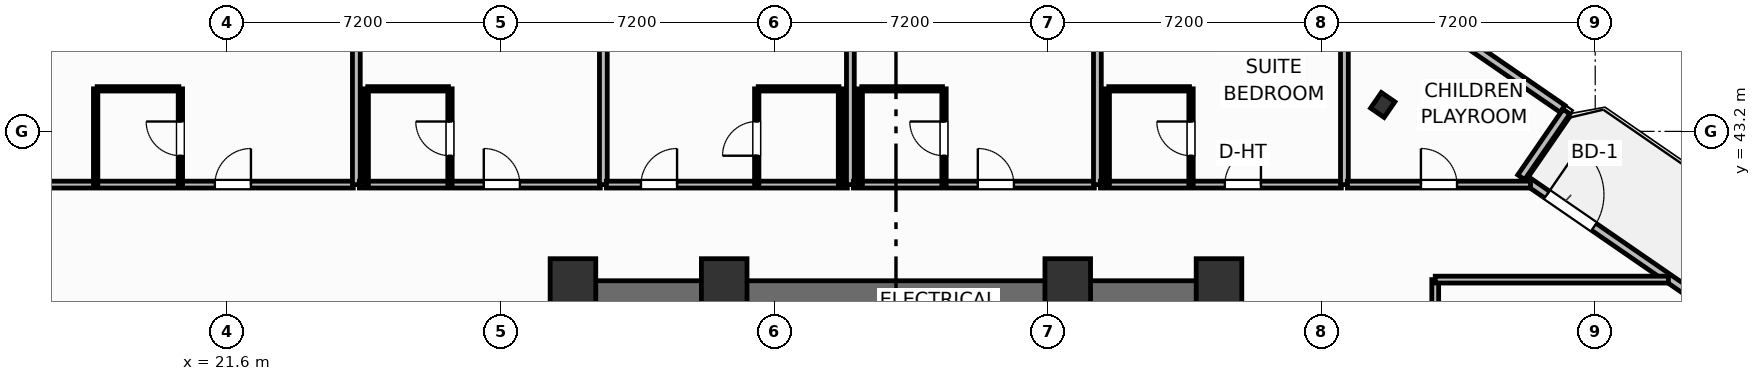
"""IFC4 building model, lengths in metres.
Left out: names, types, materials, properties, quantities, classifications, styles, units other than length and angle.
Written with IfcOpenShell. Run it as: python <this file> out.ifc"""

import sys

from ifc_helpers import new_model, si_unit, direction, frame, frame_2d, origin, origin_2d, place, context, subcontext, project, spatial, rectangle, i_section, extrude, element, fill, save


model = new_model("IFC4")
c1 = context("Model", 3, precision=1e-05, world=origin(), true_north=direction((0.0, 1.0)))
c2 = subcontext(c1, "Body", "Model", "MODEL_VIEW")
j1 = project(units=[si_unit("LENGTHUNIT", "METRE"), si_unit("PLANEANGLEUNIT", "RADIAN")], contexts=[c1])
p1 = place(None, origin())
s1 = spatial("IfcSite", under=j1, at=p1, CompositionType="ELEMENT")
p2 = place(p1, origin())
s2 = spatial("IfcBuilding", under=s1, at=p2, CompositionType="ELEMENT")
p3 = place(p2, frame((0.0, 0.0, 60.3)))
s3 = spatial("IfcBuildingStorey", under=s2, at=p3, CompositionType="ELEMENT", Elevation=60.3)
for number, where, z_axis, x_axis in (
    (1, (30.7, 39.05, 0.0), (0.0, 0.0, 1.0), (1.0, 0.0, 0.0)),
    (2, (34.68, 39.05, 0.0), (0.0, 0.0, 1.0), (1.0, 0.0, 0.0)),
    (3, (43.72, 39.05, 0.0), (0.0, 0.0, 1.0), (1.0, 0.0, 0.0)),
    (4, (47.7, 39.05, 0.0), (0.0, 0.0, 1.0), (1.0, 0.0, 0.0)),
):
    element("IfcColumn", number, at=place(p3, frame(where, z_axis=z_axis, x_axis=x_axis)), inside=s3, PredefinedType="COLUMN", context=c2, shape_type="SweptSolid", body=[
        extrude(rectangle(XDim=1.2, YDim=1.6, at=origin_2d()), origin(), (0.0, 0.0, 1.0), 3.7),
    ])
p4 = place(p3, frame((30.28, 38.845, 0.0), z_axis=(0.0, 0.0, 1.0), x_axis=(1.0, 0.0, 0.0)))
e5 = element("IfcWall", 5, at=p4, inside=s3, PredefinedType="SHEAR", context=c2, shape_type="SweptSolid", body=[
    extrude(rectangle(XDim=17.84, YDim=0.85, at=frame_2d((8.92, 0.0))), origin(), (0.0, 0.0, 1.0), 3.45),
])
p5 = place(p3, frame((52.009, 43.896, 0.0), z_axis=(0.0, 0.0, 1.0), x_axis=(0.823532597628, -0.567268949127, 0.0)))
e6 = element("IfcColumn", 6, at=p5, inside=s3, PredefinedType="COLUMN", context=c2, shape_type="SweptSolid", body=[
    extrude(i_section(OverallWidth=0.432, OverallDepth=0.498, WebThickness=0.056, FlangeThickness=0.089, FilletRadius=0.025, at=origin_2d()), origin(), (0.0, 0.0, 1.0), 3.7),
])
p6 = place(p3, frame((55.757, 41.933, 0.0), z_axis=(0.0, 0.0, 1.0), x_axis=(0.823534636215, -0.567265989598, 0.0)))
e7 = element("IfcWall", 7, at=p6, inside=s3, PredefinedType="SOLIDWALL", context=c2, shape_type="SweptSolid", body=[
    extrude(rectangle(XDim=6.0, YDim=0.22, at=frame_2d((3.0, 0.0))), origin(), (0.0, 0.0, 1.0), 2.73),
])
p7 = place(p6, frame((0.696, 0.0, 0.0)))
e8 = element("IfcOpeningElement", 8, at=p7, cuts=e7, PredefinedType="OPENING", context=c2, shape_type="SweptSolid", body=[
    extrude(rectangle(XDim=1.5, YDim=2.25, at=frame_2d((0.75, 1.125))), frame((0.0, 0.12, 0.0), z_axis=(0.0, -1.0, 0.0), x_axis=(1.0, 0.0, 0.0)), (0.0, 0.0, 1.0), 0.24),
])
p8 = place(p3, frame((55.653, 41.993, 0.0), z_axis=(0.0, 0.0, 1.0), x_axis=(0.567273696173, 0.823529327729, 0.0)))
e9 = element("IfcWall", 9, at=p8, inside=s3, PredefinedType="SOLIDWALL", context=c2, shape_type="SweptSolid", body=[
    extrude(rectangle(XDim=2.1, YDim=0.22, at=frame_2d((1.05, 0.0))), origin(), (0.0, 0.0, 1.0), 2.73),
])
p9 = place(p3, frame((56.741, 43.793, 0.0), z_axis=(0.0, 0.0, 1.0), x_axis=(-0.823530942962, 0.56727135128, 0.0)))
e10 = element("IfcWall", 10, at=p9, inside=s3, PredefinedType="SOLIDWALL", context=c2, shape_type="SweptSolid", body=[
    extrude(rectangle(XDim=8.035, YDim=0.22, at=frame_2d((4.018, 0.0))), origin(), (0.0, 0.0, 1.0), 2.73),
])
p10 = place(p9, frame((3.192, 0.0, 0.8)))
e11 = element("IfcOpeningElement", 11, at=p10, cuts=e10, PredefinedType="OPENING", context=c2, shape_type="SweptSolid", body=[
    extrude(rectangle(XDim=1.65, YDim=1.65, at=frame_2d((0.825, 0.825))), frame((0.0, 0.12, 0.0), z_axis=(0.0, -1.0, 0.0), x_axis=(1.0, 0.0, 0.0)), (0.0, 0.0, 1.0), 0.24),
])
p11 = place(p3, frame((3.176, 41.8, 0.0), z_axis=(0.0, 0.0, 1.0), x_axis=(1.0, 0.0, 0.0)))
e12 = element("IfcWall", 12, at=p11, inside=s3, PredefinedType="PARTITIONING", context=c2, shape_type="SweptSolid", body=[
    extrude(rectangle(XDim=21.744, YDim=0.18, at=frame_2d((10.872, 0.0))), origin(), (0.0, 0.0, 1.0), 3.45),
])
p12 = place(p11, frame((18.101, 0.0, 0.0)))
e13 = element("IfcOpeningElement", 13, at=p12, cuts=e12, PredefinedType="OPENING", context=c2, shape_type="SweptSolid", body=[
    extrude(rectangle(XDim=0.95, YDim=2.15, at=frame_2d((0.475, 1.075))), frame((0.0, 0.1, 0.0), z_axis=(0.0, -1.0, 0.0), x_axis=(1.0, 0.0, 0.0)), (0.0, 0.0, 1.0), 0.2),
])
p13 = place(p3, frame((18.18, 44.32, 0.0), z_axis=(0.0, 0.0, 1.0), x_axis=(1.0, 0.0, 0.0)))
e14 = element("IfcWall", 14, at=p13, inside=s3, PredefinedType="PARTITIONING", context=c2, shape_type="SweptSolid", body=[
    extrude(rectangle(XDim=2.15, YDim=0.115, at=frame_2d((1.075, 0.0))), origin(), (0.0, 0.0, 1.0), 3.45),
])
p14 = place(p3, frame((20.37, 41.8, 0.0), z_axis=(0.0, 0.0, 1.0), x_axis=(0.0, 1.0, 0.0)))
e15 = element("IfcWall", 15, at=p14, inside=s3, PredefinedType="PARTITIONING", context=c2, shape_type="SweptSolid", body=[
    extrude(rectangle(XDim=2.52, YDim=0.115, at=frame_2d((1.26, 0.0))), origin(), (0.0, 0.0, 1.0), 3.45),
])
p15 = place(p14, frame((0.76, 0.0, 0.0)))
e16 = element("IfcOpeningElement", 16, at=p15, cuts=e15, PredefinedType="OPENING", context=c2, shape_type="SweptSolid", body=[
    extrude(rectangle(XDim=0.9, YDim=2.05, at=frame_2d((0.45, 1.025))), frame((0.0, 0.067, 0.0), z_axis=(0.0, -1.0, 0.0), x_axis=(1.0, 0.0, 0.0)), (0.0, 0.0, 1.0), 0.135),
])
p16 = place(p3, frame((18.14, 41.8, 0.0), z_axis=(0.0, 0.0, 1.0), x_axis=(0.0, 1.0, 0.0)))
e17 = element("IfcWall", 17, at=p16, inside=s3, PredefinedType="PARTITIONING", context=c2, shape_type="SweptSolid", body=[
    extrude(rectangle(XDim=2.52, YDim=0.115, at=frame_2d((1.26, 0.0))), origin(), (0.0, 0.0, 1.0), 3.45),
])
p17 = place(p3, frame((25.0, 41.8, 0.0), z_axis=(0.0, 0.0, 1.0), x_axis=(0.0, 1.0, 0.0)))
e18 = element("IfcWall", 18, at=p17, inside=s3, PredefinedType="PARTITIONING", context=c2, shape_type="SweptSolid", body=[
    extrude(rectangle(XDim=14.2, YDim=0.205, at=frame_2d((7.1, 0.0))), origin(), (0.0, 0.0, 1.0), 3.45),
])
p18 = place(p3, frame((25.08, 41.8, 0.0), z_axis=(0.0, 0.0, 1.0), x_axis=(1.0, 0.0, 0.0)))
e19 = element("IfcWall", 19, at=p18, inside=s3, PredefinedType="PARTITIONING", context=c2, shape_type="SweptSolid", body=[
    extrude(rectangle(XDim=6.34, YDim=0.18, at=frame_2d((3.17, 0.0))), origin(), (0.0, 0.0, 1.0), 3.45),
])
p19 = place(p18, frame((3.274, 0.0, 0.0)))
e20 = element("IfcOpeningElement", 20, at=p19, cuts=e19, PredefinedType="OPENING", context=c2, shape_type="SweptSolid", body=[
    extrude(rectangle(XDim=0.95, YDim=2.15, at=frame_2d((0.475, 1.075))), frame((0.0, 0.1, 0.0), z_axis=(0.0, -1.0, 0.0), x_axis=(1.0, 0.0, 0.0)), (0.0, 0.0, 1.0), 0.2),
])
p20 = place(p3, frame((25.3, 44.32, 0.0), z_axis=(0.0, 0.0, 1.0), x_axis=(1.0, 0.0, 0.0)))
e21 = element("IfcWall", 21, at=p20, inside=s3, PredefinedType="PARTITIONING", context=c2, shape_type="SweptSolid", body=[
    extrude(rectangle(XDim=2.124, YDim=0.115, at=frame_2d((1.062, 0.0))), origin(), (0.0, 0.0, 1.0), 3.45),
])
p21 = place(p3, frame((27.464, 41.8, 0.0), z_axis=(0.0, 0.0, 1.0), x_axis=(0.0, 1.0, 0.0)))
e22 = element("IfcWall", 22, at=p21, inside=s3, PredefinedType="PARTITIONING", context=c2, shape_type="SweptSolid", body=[
    extrude(rectangle(XDim=2.52, YDim=0.115, at=frame_2d((1.26, 0.0))), origin(), (0.0, 0.0, 1.0), 3.45),
])
p22 = place(p21, frame((0.76, 0.0, 0.0)))
e23 = element("IfcOpeningElement", 23, at=p22, cuts=e22, PredefinedType="OPENING", context=c2, shape_type="SweptSolid", body=[
    extrude(rectangle(XDim=0.9, YDim=2.05, at=frame_2d((0.45, 1.025))), frame((0.0, 0.067, 0.0), z_axis=(0.0, -1.0, 0.0), x_axis=(1.0, 0.0, 0.0)), (0.0, 0.0, 1.0), 0.135),
])
p23 = place(p3, frame((25.26, 41.8, 0.0), z_axis=(0.0, 0.0, 1.0), x_axis=(0.0, 1.0, 0.0)))
e24 = element("IfcWall", 24, at=p23, inside=s3, PredefinedType="PARTITIONING", context=c2, shape_type="SweptSolid", body=[
    extrude(rectangle(XDim=2.52, YDim=0.115, at=frame_2d((1.26, 0.0))), origin(), (0.0, 0.0, 1.0), 3.45),
])
p24 = place(p3, frame((31.5, 41.8, 0.0), z_axis=(0.0, 0.0, 1.0), x_axis=(0.0, 1.0, 0.0)))
e25 = element("IfcWall", 25, at=p24, inside=s3, PredefinedType="PARTITIONING", context=c2, shape_type="SweptSolid", body=[
    extrude(rectangle(XDim=14.2, YDim=0.205, at=frame_2d((7.1, 0.0))), origin(), (0.0, 0.0, 1.0), 3.45),
])
p25 = place(p3, frame((31.58, 41.8, 0.0), z_axis=(0.0, 0.0, 1.0), x_axis=(1.0, 0.0, 0.0)))
e26 = element("IfcWall", 26, at=p25, inside=s3, PredefinedType="PARTITIONING", context=c2, shape_type="SweptSolid", body=[
    extrude(rectangle(XDim=6.34, YDim=0.18, at=frame_2d((3.17, 0.0))), origin(), (0.0, 0.0, 1.0), 3.45),
])
p26 = place(p25, frame((0.91, 0.0, 0.0)))
e27 = element("IfcOpeningElement", 27, at=p26, cuts=e26, PredefinedType="OPENING", context=c2, shape_type="SweptSolid", body=[
    extrude(rectangle(XDim=0.95, YDim=2.15, at=frame_2d((0.475, 1.075))), frame((0.0, 0.1, 0.0), z_axis=(0.0, -1.0, 0.0), x_axis=(1.0, 0.0, 0.0)), (0.0, 0.0, 1.0), 0.2),
])
p27 = place(p3, frame((35.576, 44.32, 0.0), z_axis=(0.0, 0.0, 1.0), x_axis=(1.0, 0.0, 0.0)))
e28 = element("IfcWall", 28, at=p27, inside=s3, PredefinedType="PARTITIONING", context=c2, shape_type="SweptSolid", body=[
    extrude(rectangle(XDim=2.124, YDim=0.115, at=frame_2d((1.062, 0.0))), origin(), (0.0, 0.0, 1.0), 3.45),
])
p28 = place(p3, frame((35.536, 41.8, 0.0), z_axis=(0.0, 0.0, 1.0), x_axis=(0.0, 1.0, 0.0)))
e29 = element("IfcWall", 29, at=p28, inside=s3, PredefinedType="PARTITIONING", context=c2, shape_type="SweptSolid", body=[
    extrude(rectangle(XDim=2.52, YDim=0.115, at=frame_2d((1.26, 0.0))), origin(), (0.0, 0.0, 1.0), 3.45),
])
p29 = place(p28, frame((0.76, 0.0, 0.0)))
e30 = element("IfcOpeningElement", 30, at=p29, cuts=e29, PredefinedType="OPENING", context=c2, shape_type="SweptSolid", body=[
    extrude(rectangle(XDim=0.9, YDim=2.05, at=frame_2d((0.45, 1.025))), frame((0.0, 0.067, 0.0), z_axis=(0.0, -1.0, 0.0), x_axis=(1.0, 0.0, 0.0)), (0.0, 0.0, 1.0), 0.135),
])
p30 = place(p3, frame((37.74, 41.8, 0.0), z_axis=(0.0, 0.0, 1.0), x_axis=(0.0, 1.0, 0.0)))
e31 = element("IfcWall", 31, at=p30, inside=s3, PredefinedType="PARTITIONING", context=c2, shape_type="SweptSolid", body=[
    extrude(rectangle(XDim=2.52, YDim=0.115, at=frame_2d((1.26, 0.0))), origin(), (0.0, 0.0, 1.0), 3.45),
])
p31 = place(p3, frame((38.0, 41.8, 0.0), z_axis=(0.0, 0.0, 1.0), x_axis=(0.0, 1.0, 0.0)))
e32 = element("IfcWall", 32, at=p31, inside=s3, PredefinedType="PARTITIONING", context=c2, shape_type="SweptSolid", body=[
    extrude(rectangle(XDim=14.797, YDim=0.205, at=frame_2d((7.398, 0.0))), origin(), (0.0, 0.0, 1.0), 3.45),
])
p32 = place(p3, frame((38.08, 41.8, 0.0), z_axis=(0.0, 0.0, 1.0), x_axis=(1.0, 0.0, 0.0)))
e33 = element("IfcWall", 33, at=p32, inside=s3, PredefinedType="PARTITIONING", context=c2, shape_type="SweptSolid", body=[
    extrude(rectangle(XDim=6.34, YDim=0.18, at=frame_2d((3.17, 0.0))), origin(), (0.0, 0.0, 1.0), 3.45),
])
p33 = place(p32, frame((3.274, 0.0, 0.0)))
e34 = element("IfcOpeningElement", 34, at=p33, cuts=e33, PredefinedType="OPENING", context=c2, shape_type="SweptSolid", body=[
    extrude(rectangle(XDim=0.95, YDim=2.15, at=frame_2d((0.475, 1.075))), frame((0.0, 0.1, 0.0), z_axis=(0.0, -1.0, 0.0), x_axis=(1.0, 0.0, 0.0)), (0.0, 0.0, 1.0), 0.2),
])
p34 = place(p3, frame((38.3, 44.32, 0.0), z_axis=(0.0, 0.0, 1.0), x_axis=(1.0, 0.0, 0.0)))
e35 = element("IfcWall", 35, at=p34, inside=s3, PredefinedType="PARTITIONING", context=c2, shape_type="SweptSolid", body=[
    extrude(rectangle(XDim=2.124, YDim=0.115, at=frame_2d((1.062, 0.0))), origin(), (0.0, 0.0, 1.0), 3.45),
])
p35 = place(p3, frame((40.464, 41.8, 0.0), z_axis=(0.0, 0.0, 1.0), x_axis=(0.0, 1.0, 0.0)))
e36 = element("IfcWall", 36, at=p35, inside=s3, PredefinedType="PARTITIONING", context=c2, shape_type="SweptSolid", body=[
    extrude(rectangle(XDim=2.52, YDim=0.115, at=frame_2d((1.26, 0.0))), origin(), (0.0, 0.0, 1.0), 3.45),
])
p36 = place(p35, frame((0.76, 0.0, 0.0)))
e37 = element("IfcOpeningElement", 37, at=p36, cuts=e36, PredefinedType="OPENING", context=c2, shape_type="SweptSolid", body=[
    extrude(rectangle(XDim=0.9, YDim=2.05, at=frame_2d((0.45, 1.025))), frame((0.0, 0.067, 0.0), z_axis=(0.0, -1.0, 0.0), x_axis=(1.0, 0.0, 0.0)), (0.0, 0.0, 1.0), 0.135),
])
p37 = place(p3, frame((38.26, 41.8, 0.0), z_axis=(0.0, 0.0, 1.0), x_axis=(0.0, 1.0, 0.0)))
e38 = element("IfcWall", 38, at=p37, inside=s3, PredefinedType="PARTITIONING", context=c2, shape_type="SweptSolid", body=[
    extrude(rectangle(XDim=2.52, YDim=0.115, at=frame_2d((1.26, 0.0))), origin(), (0.0, 0.0, 1.0), 3.45),
])
p38 = place(p3, frame((44.5, 41.8, 0.0), z_axis=(0.0, 0.0, 1.0), x_axis=(0.0, 1.0, 0.0)))
e39 = element("IfcWall", 39, at=p38, inside=s3, PredefinedType="PARTITIONING", context=c2, shape_type="SweptSolid", body=[
    extrude(rectangle(XDim=7.851, YDim=0.205, at=frame_2d((3.925, 0.0))), origin(), (0.0, 0.0, 1.0), 3.45),
])
p39 = place(p3, frame((44.58, 41.8, 0.0), z_axis=(0.0, 0.0, 1.0), x_axis=(1.0, 0.0, 0.0)))
e40 = element("IfcWall", 40, at=p39, inside=s3, PredefinedType="PARTITIONING", context=c2, shape_type="SweptSolid", body=[
    extrude(rectangle(XDim=6.34, YDim=0.18, at=frame_2d((3.17, 0.0))), origin(), (0.0, 0.0, 1.0), 3.45),
])
p40 = place(p39, frame((3.274, 0.0, 0.0)))
e41 = element("IfcOpeningElement", 41, at=p40, cuts=e40, PredefinedType="OPENING", context=c2, shape_type="SweptSolid", body=[
    extrude(rectangle(XDim=0.95, YDim=2.15, at=frame_2d((0.475, 1.075))), frame((0.0, 0.1, 0.0), z_axis=(0.0, -1.0, 0.0), x_axis=(1.0, 0.0, 0.0)), (0.0, 0.0, 1.0), 0.2),
])
p41 = place(p3, frame((44.8, 44.32, 0.0), z_axis=(0.0, 0.0, 1.0), x_axis=(1.0, 0.0, 0.0)))
e42 = element("IfcWall", 42, at=p41, inside=s3, PredefinedType="PARTITIONING", context=c2, shape_type="SweptSolid", body=[
    extrude(rectangle(XDim=2.124, YDim=0.115, at=frame_2d((1.062, 0.0))), origin(), (0.0, 0.0, 1.0), 3.45),
])
p42 = place(p3, frame((46.964, 41.8, 0.0), z_axis=(0.0, 0.0, 1.0), x_axis=(0.0, 1.0, 0.0)))
e43 = element("IfcWall", 43, at=p42, inside=s3, PredefinedType="PARTITIONING", context=c2, shape_type="SweptSolid", body=[
    extrude(rectangle(XDim=2.52, YDim=0.115, at=frame_2d((1.26, 0.0))), origin(), (0.0, 0.0, 1.0), 2.58),
])
p43 = place(p42, frame((0.76, 0.0, 0.0)))
e44 = element("IfcOpeningElement", 44, at=p43, cuts=e43, PredefinedType="OPENING", context=c2, shape_type="SweptSolid", body=[
    extrude(rectangle(XDim=0.9, YDim=2.05, at=frame_2d((0.45, 1.025))), frame((0.0, 0.067, 0.0), z_axis=(0.0, -1.0, 0.0), x_axis=(1.0, 0.0, 0.0)), (0.0, 0.0, 1.0), 0.135),
])
p44 = place(p3, frame((44.76, 41.8, 0.0), z_axis=(0.0, 0.0, 1.0), x_axis=(0.0, 1.0, 0.0)))
e45 = element("IfcWall", 45, at=p44, inside=s3, PredefinedType="PARTITIONING", context=c2, shape_type="SweptSolid", body=[
    extrude(rectangle(XDim=2.52, YDim=0.115, at=frame_2d((1.26, 0.0))), origin(), (0.0, 0.0, 1.0), 3.45),
])
p45 = place(p3, frame((51.0, 41.8, 0.0), z_axis=(0.0, 0.0, 1.0), x_axis=(0.0, 1.0, 0.0)))
e46 = element("IfcWall", 46, at=p45, inside=s3, PredefinedType="PARTITIONING", context=c2, shape_type="SweptSolid", body=[
    extrude(rectangle(XDim=5.923, YDim=0.205, at=frame_2d((2.961, 0.0))), origin(), (0.0, 0.0, 1.0), 3.45),
])
p46 = place(p3, frame((51.08, 41.8, 0.0), z_axis=(0.0, 0.0, 1.0), x_axis=(1.0, 0.0, 0.0)))
e47 = element("IfcWall", 47, at=p46, inside=s3, PredefinedType="PARTITIONING", context=c2, shape_type="SweptSolid", body=[
    extrude(rectangle(XDim=4.817, YDim=0.18, at=frame_2d((2.408, 0.0))), origin(), (0.0, 0.0, 1.0), 3.45),
])
p47 = place(p46, frame((1.934, 0.0, 0.0)))
e48 = element("IfcOpeningElement", 48, at=p47, cuts=e47, PredefinedType="OPENING", context=c2, shape_type="SweptSolid", body=[
    extrude(rectangle(XDim=0.95, YDim=2.05, at=frame_2d((0.475, 1.025))), frame((0.0, 0.1, 0.0), z_axis=(0.0, -1.0, 0.0), x_axis=(1.0, 0.0, 0.0)), (0.0, 0.0, 1.0), 0.2),
])
p48 = place(p3, frame((53.39, 26.84, 0.0), z_axis=(0.0, 0.0, 1.0), x_axis=(0.0, 1.0, 0.0)))
e49 = element("IfcWall", 49, at=p48, inside=s3, PredefinedType="PARTITIONING", context=c2, shape_type="SweptSolid", body=[
    extrude(rectangle(XDim=12.46, YDim=0.18, at=frame_2d((6.23, 0.0))), origin(), (0.0, 0.0, 1.0), 3.45),
])
p49 = place(p48, frame((0.618, 0.0, 0.0)))
e50 = element("IfcOpeningElement", 50, at=p49, cuts=e49, PredefinedType="OPENING", context=c2, shape_type="SweptSolid", body=[
    extrude(rectangle(XDim=0.92, YDim=2.05, at=frame_2d((0.46, 1.025))), frame((0.0, 0.1, 0.0), z_axis=(0.0, -1.0, 0.0), x_axis=(1.0, 0.0, 0.0)), (0.0, 0.0, 1.0), 0.2),
])
p50 = place(p3, frame((53.39, 39.3, 0.0), z_axis=(0.0, 0.0, 1.0), x_axis=(1.0, 0.0, 0.0)))
e51 = element("IfcWall", 51, at=p50, inside=s3, PredefinedType="PARTITIONING", context=c2, shape_type="SweptSolid", body=[
    extrude(rectangle(XDim=6.136, YDim=0.18, at=frame_2d((3.068, 0.0))), origin(), (0.0, 0.0, 1.0), 3.45),
])
p51 = place(p7, origin())
e52 = element("IfcDoor", 52, at=p51, inside=s3, OperationType="SINGLE_SWING_LEFT", PredefinedType="DOOR", context=c2, shape_type="SweptSolid", body=[
    extrude(rectangle(XDim=1.5, YDim=2.25, at=frame_2d((0.75, 1.125))), frame((0.0, 0.025, 0.0), z_axis=(0.0, -1.0, 0.0), x_axis=(1.0, 0.0, 0.0)), (0.0, 0.0, 1.0), 0.05),
])
fill(e8, e52)
p52 = place(p12, origin())
e53 = element("IfcDoor", 53, at=p52, inside=s3, OperationType="SINGLE_SWING_RIGHT", PredefinedType="DOOR", context=c2, shape_type="SweptSolid", body=[
    extrude(rectangle(XDim=0.95, YDim=2.15, at=frame_2d((0.475, 1.075))), frame((0.0, 0.025, 0.0), z_axis=(0.0, -1.0, 0.0), x_axis=(1.0, 0.0, 0.0)), (0.0, 0.0, 1.0), 0.05),
])
fill(e13, e53)
p53 = place(p15, origin())
e54 = element("IfcDoor", 54, at=p53, inside=s3, OperationType="SINGLE_SWING_RIGHT", PredefinedType="DOOR", context=c2, shape_type="SweptSolid", body=[
    extrude(rectangle(XDim=0.9, YDim=2.05, at=frame_2d((0.45, 1.025))), frame((0.0, 0.025, 0.0), z_axis=(0.0, -1.0, 0.0), x_axis=(1.0, 0.0, 0.0)), (0.0, 0.0, 1.0), 0.05),
])
fill(e16, e54)
p54 = place(p19, origin())
e55 = element("IfcDoor", 55, at=p54, inside=s3, OperationType="SINGLE_SWING_LEFT", PredefinedType="DOOR", context=c2, shape_type="SweptSolid", body=[
    extrude(rectangle(XDim=0.95, YDim=2.15, at=frame_2d((0.475, 1.075))), frame((0.0, 0.025, 0.0), z_axis=(0.0, -1.0, 0.0), x_axis=(1.0, 0.0, 0.0)), (0.0, 0.0, 1.0), 0.05),
])
fill(e20, e55)
p55 = place(p22, origin())
e56 = element("IfcDoor", 56, at=p55, inside=s3, OperationType="SINGLE_SWING_RIGHT", PredefinedType="DOOR", context=c2, shape_type="SweptSolid", body=[
    extrude(rectangle(XDim=0.9, YDim=2.05, at=frame_2d((0.45, 1.025))), frame((0.0, 0.025, 0.0), z_axis=(0.0, -1.0, 0.0), x_axis=(1.0, 0.0, 0.0)), (0.0, 0.0, 1.0), 0.05),
])
fill(e23, e56)
p56 = place(p26, origin())
e57 = element("IfcDoor", 57, at=p56, inside=s3, OperationType="SINGLE_SWING_RIGHT", PredefinedType="DOOR", context=c2, shape_type="SweptSolid", body=[
    extrude(rectangle(XDim=0.95, YDim=2.15, at=frame_2d((0.475, 1.075))), frame((0.0, 0.025, 0.0), z_axis=(0.0, -1.0, 0.0), x_axis=(1.0, 0.0, 0.0)), (0.0, 0.0, 1.0), 0.05),
])
fill(e27, e57)
p57 = place(p29, origin())
e58 = element("IfcDoor", 58, at=p57, inside=s3, OperationType="SINGLE_SWING_LEFT", PredefinedType="DOOR", context=c2, shape_type="SweptSolid", body=[
    extrude(rectangle(XDim=0.9, YDim=2.05, at=frame_2d((0.45, 1.025))), frame((0.0, 0.025, 0.0), z_axis=(0.0, -1.0, 0.0), x_axis=(1.0, 0.0, 0.0)), (0.0, 0.0, 1.0), 0.05),
])
fill(e30, e58)
p58 = place(p33, origin())
e59 = element("IfcDoor", 59, at=p58, inside=s3, OperationType="SINGLE_SWING_LEFT", PredefinedType="DOOR", context=c2, shape_type="SweptSolid", body=[
    extrude(rectangle(XDim=0.95, YDim=2.15, at=frame_2d((0.475, 1.075))), frame((0.0, 0.025, 0.0), z_axis=(0.0, -1.0, 0.0), x_axis=(1.0, 0.0, 0.0)), (0.0, 0.0, 1.0), 0.05),
])
fill(e34, e59)
p59 = place(p36, origin())
e60 = element("IfcDoor", 60, at=p59, inside=s3, OperationType="SINGLE_SWING_RIGHT", PredefinedType="DOOR", context=c2, shape_type="SweptSolid", body=[
    extrude(rectangle(XDim=0.9, YDim=2.05, at=frame_2d((0.45, 1.025))), frame((0.0, 0.025, 0.0), z_axis=(0.0, -1.0, 0.0), x_axis=(1.0, 0.0, 0.0)), (0.0, 0.0, 1.0), 0.05),
])
fill(e37, e60)
p60 = place(p40, origin())
e61 = element("IfcDoor", 61, at=p60, inside=s3, OperationType="SINGLE_SWING_RIGHT", PredefinedType="DOOR", context=c2, shape_type="SweptSolid", body=[
    extrude(rectangle(XDim=0.95, YDim=2.15, at=frame_2d((0.475, 1.075))), frame((0.0, 0.025, 0.0), z_axis=(0.0, -1.0, 0.0), x_axis=(1.0, 0.0, 0.0)), (0.0, 0.0, 1.0), 0.05),
])
fill(e41, e61)
p61 = place(p43, origin())
e62 = element("IfcDoor", 62, at=p61, inside=s3, OperationType="SINGLE_SWING_RIGHT", PredefinedType="DOOR", context=c2, shape_type="SweptSolid", body=[
    extrude(rectangle(XDim=0.9, YDim=2.05, at=frame_2d((0.45, 1.025))), frame((0.0, 0.025, 0.0), z_axis=(0.0, -1.0, 0.0), x_axis=(1.0, 0.0, 0.0)), (0.0, 0.0, 1.0), 0.05),
])
fill(e44, e62)
p62 = place(p47, origin())
e63 = element("IfcDoor", 63, at=p62, inside=s3, OperationType="SINGLE_SWING_LEFT", PredefinedType="DOOR", context=c2, shape_type="SweptSolid", body=[
    extrude(rectangle(XDim=0.95, YDim=2.05, at=frame_2d((0.475, 1.025))), frame((0.0, 0.025, 0.0), z_axis=(0.0, -1.0, 0.0), x_axis=(1.0, 0.0, 0.0)), (0.0, 0.0, 1.0), 0.05),
])
fill(e48, e63)
save(model, sys.argv[1])
